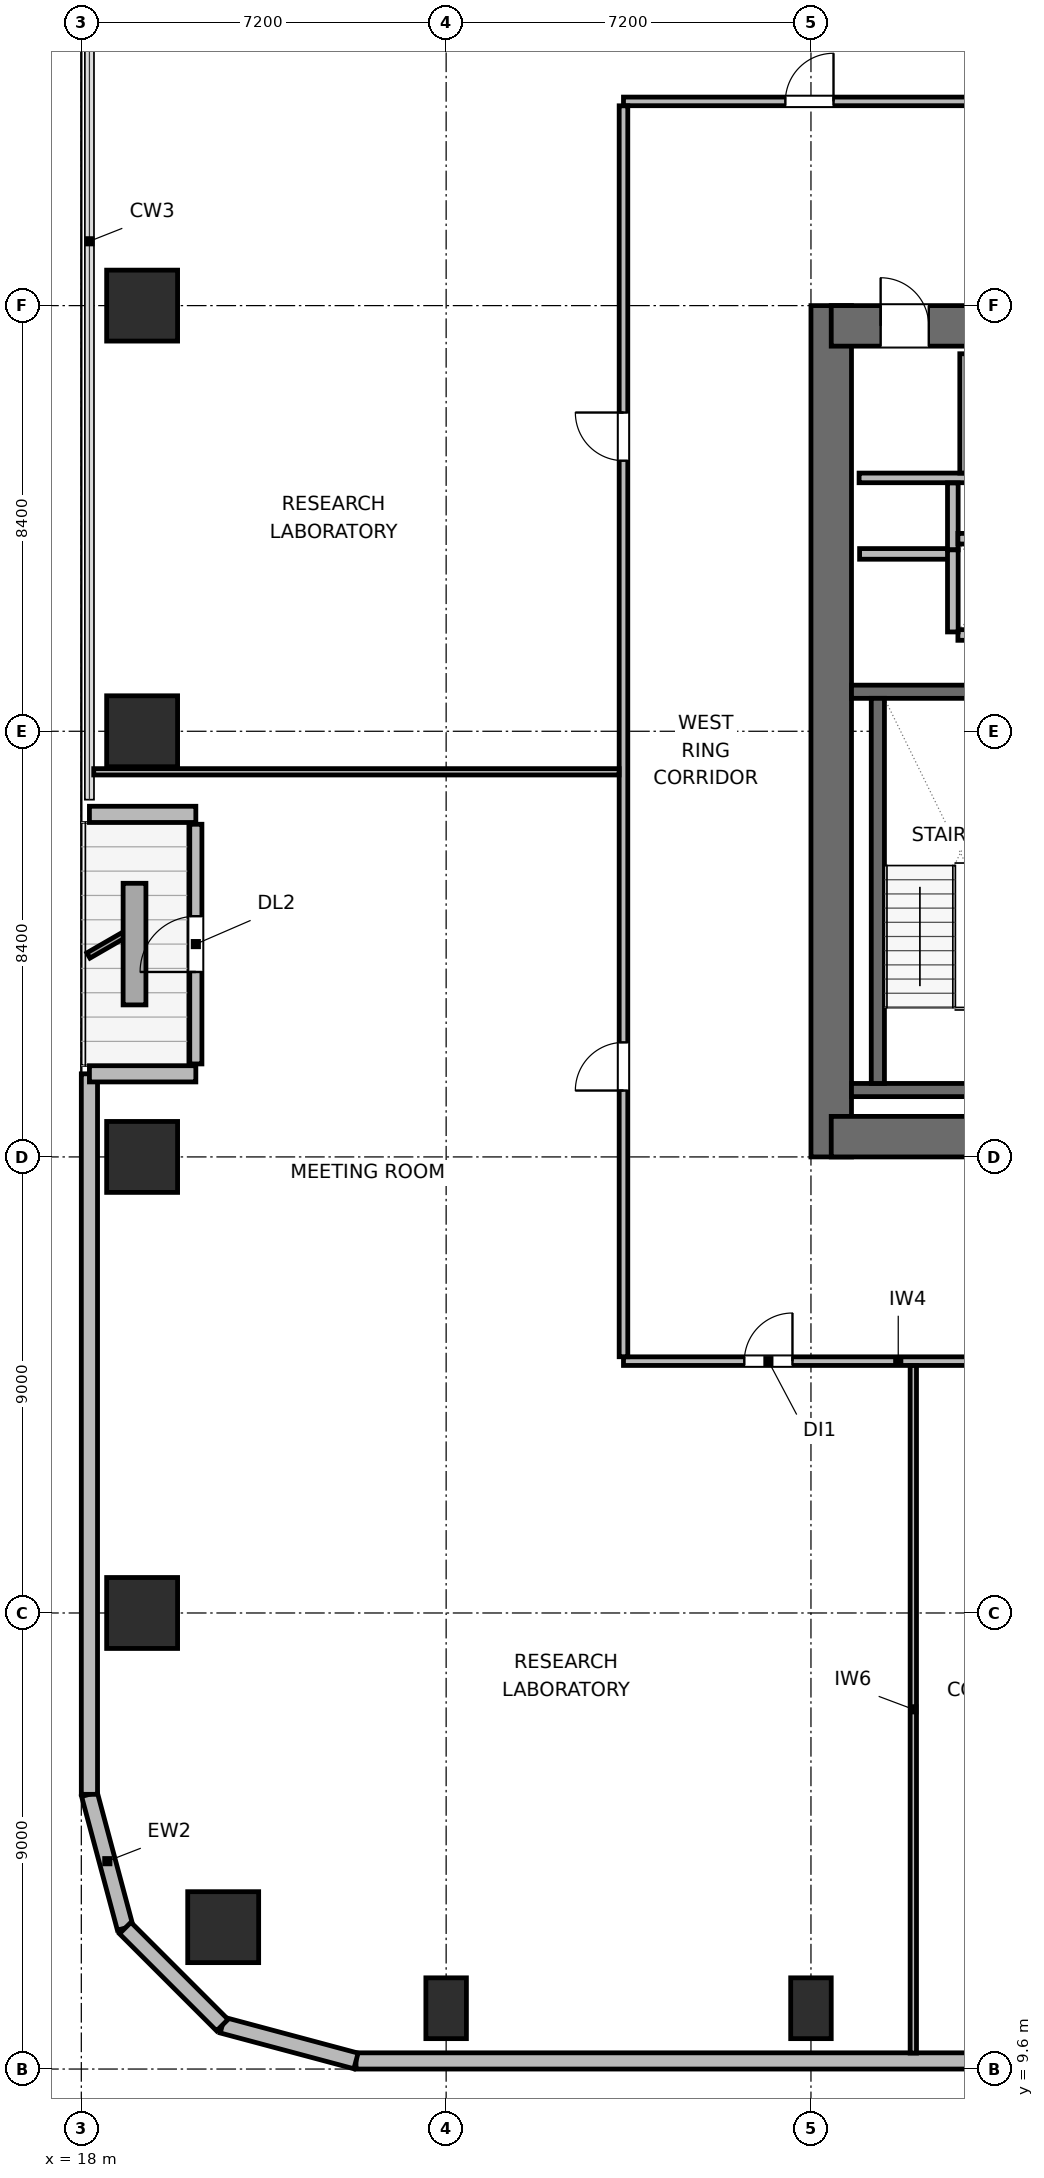
"""IFC4 building model, lengths in metres.
Left out: names, types, materials, properties, quantities, classifications, styles, units other than length and angle.
Written with IfcOpenShell. Run it as: python <this file> out.ifc"""

import sys

from ifc_helpers import new_model, si_unit, direction, frame, frame_2d, origin, origin_2d, place, context, subcontext, project, spatial, rectangle, circle, extrude, element, fill, save


model = new_model("IFC4")
c1 = context("Model", 3, precision=1e-05, world=origin(), true_north=direction((0.0, 1.0)))
c2 = subcontext(c1, "Body", "Model", "MODEL_VIEW")
j1 = project(units=[si_unit("LENGTHUNIT", "METRE"), si_unit("PLANEANGLEUNIT", "RADIAN")], contexts=[c1])
p1 = place(None, origin())
s1 = spatial("IfcSite", under=j1, at=p1, CompositionType="ELEMENT")
p2 = place(p1, origin())
s2 = spatial("IfcBuilding", under=s1, at=p2, CompositionType="ELEMENT")
p3 = place(p2, frame((0.0, 0.0, 109.2)))
s3 = spatial("IfcBuildingStorey", under=s2, at=p3, CompositionType="ELEMENT", Elevation=109.2)
p4 = place(p3, frame((32.8, 27.6, 0.0), z_axis=(0.0, 0.0, 1.0), x_axis=(0.0, 1.0, 0.0)))
e1 = element("IfcWall", 1, at=p4, inside=s3, PredefinedType="SHEAR", context=c2, shape_type="SweptSolid", body=[
    extrude(rectangle(XDim=16.8, YDim=0.8, at=frame_2d((8.4, 0.0))), origin(), (0.0, 0.0, 1.0), 3.9),
])
p5 = place(p3, frame((32.8, 28.0, 0.0), z_axis=(0.0, 0.0, 1.0), x_axis=(1.0, 0.0, 0.0)))
e2 = element("IfcWall", 2, at=p5, inside=s3, PredefinedType="SHEAR", context=c2, shape_type="SweptSolid", body=[
    extrude(rectangle(XDim=9.2, YDim=0.8, at=frame_2d((4.6, 0.0))), origin(), (0.0, 0.0, 1.0), 3.9),
])
p6 = place(p5, frame((4.975, 0.0, 0.0)))
e3 = element("IfcOpeningElement", 3, at=p6, cuts=e2, PredefinedType="OPENING", context=c2, shape_type="SweptSolid", body=[
    extrude(rectangle(XDim=1.05, YDim=2.04, at=frame_2d((0.525, 1.02))), frame((0.0, 0.41, 0.0), z_axis=(0.0, -1.0, 0.0), x_axis=(1.0, 0.0, 0.0)), (0.0, 0.0, 1.0), 0.82),
])
p7 = place(p3, frame((32.8, 44.0, 0.0), z_axis=(0.0, 0.0, 1.0), x_axis=(1.0, 0.0, 0.0)))
e4 = element("IfcWall", 4, at=p7, inside=s3, PredefinedType="SHEAR", context=c2, shape_type="SweptSolid", body=[
    extrude(rectangle(XDim=9.2, YDim=0.8, at=frame_2d((4.6, 0.0))), origin(), (0.0, 0.0, 1.0), 3.9),
])
p8 = place(p7, frame((0.975, 0.0, 0.0)))
e5 = element("IfcOpeningElement", 5, at=p8, cuts=e4, PredefinedType="OPENING", context=c2, shape_type="SweptSolid", body=[
    extrude(rectangle(XDim=0.95, YDim=2.04, at=frame_2d((0.475, 1.02))), frame((0.0, 0.41, 0.0), z_axis=(0.0, -1.0, 0.0), x_axis=(1.0, 0.0, 0.0)), (0.0, 0.0, 1.0), 0.82),
])
p9 = place(p7, frame((4.225, 0.0, 0.0)))
e6 = element("IfcOpeningElement", 6, at=p9, cuts=e4, PredefinedType="OPENING", context=c2, shape_type="SweptSolid", body=[
    extrude(rectangle(XDim=0.9, YDim=2.02, at=frame_2d((0.45, 1.01))), frame((0.0, 0.41, 0.0), z_axis=(0.0, -1.0, 0.0), x_axis=(1.0, 0.0, 0.0)), (0.0, 0.0, 1.0), 0.82),
])
p10 = place(p7, frame((7.125, 0.0, 0.0)))
e7 = element("IfcOpeningElement", 7, at=p10, cuts=e4, PredefinedType="OPENING", context=c2, shape_type="SweptSolid", body=[
    extrude(rectangle(XDim=0.9, YDim=2.02, at=frame_2d((0.45, 1.01))), frame((0.0, 0.41, 0.0), z_axis=(0.0, -1.0, 0.0), x_axis=(1.0, 0.0, 0.0)), (0.0, 0.0, 1.0), 0.82),
])
for number, where, z_axis, x_axis in (
    (8, (33.2, 28.92, 0.0), (0.0, 0.0, 1.0), (1.0, 0.0, 0.0)),
    (9, (33.2, 36.78, 0.0), (0.0, 0.0, 1.0), (1.0, 0.0, 0.0)),
):
    element("IfcWall", number, at=place(p3, frame(where, z_axis=z_axis, x_axis=x_axis)), inside=s3, PredefinedType="SHEAR", context=c2, shape_type="SweptSolid", body=[
        extrude(rectangle(XDim=3.91, YDim=0.26, at=frame_2d((1.955, 0.0))), origin(), (0.0, 0.0, 1.0), 3.9),
    ])
p11 = place(p3, frame((33.72, 29.05, 0.0), z_axis=(0.0, 0.0, 1.0), x_axis=(0.0, 1.0, 0.0)))
e10 = element("IfcWall", 10, at=p11, inside=s3, PredefinedType="SHEAR", context=c2, shape_type="SweptSolid", body=[
    extrude(rectangle(XDim=7.6, YDim=0.26, at=frame_2d((3.8, 0.0))), origin(), (0.0, 0.0, 1.0), 3.9),
])
p12 = place(p3, frame((20.8, 12.4, 0.0), z_axis=(0.0, 0.0, 1.0), x_axis=(1.0, 0.0, 0.0)))
e11 = element("IfcColumn", 11, at=p12, inside=s3, PredefinedType="COLUMN", context=c2, shape_type="SweptSolid", body=[
    extrude(circle(Radius=0.7, at=origin_2d()), origin(), (0.0, 0.0, 1.0), 3.9),
])
for number, where, z_axis, x_axis in (
    (12, (25.2, 10.8, 0.0), (0.0, 0.0, 1.0), (1.0, 0.0, 0.0)),
    (13, (32.4, 10.8, 0.0), (0.0, 0.0, 1.0), (1.0, 0.0, 0.0)),
):
    element("IfcColumn", number, at=place(p3, frame(where, z_axis=z_axis, x_axis=x_axis)), inside=s3, PredefinedType="COLUMN", context=c2, shape_type="SweptSolid", body=[
        extrude(rectangle(XDim=0.8, YDim=1.2, at=origin_2d()), origin(), (0.0, 0.0, 1.0), 3.9),
    ])
for number, where, z_axis, x_axis in (
    (14, (19.2, 18.6, 0.0), (0.0, 0.0, 1.0), (1.0, 0.0, 0.0)),
    (15, (19.2, 27.6, 0.0), (0.0, 0.0, 1.0), (1.0, 0.0, 0.0)),
    (16, (19.2, 36.0, 0.0), (0.0, 0.0, 1.0), (1.0, 0.0, 0.0)),
    (17, (19.2, 44.4, 0.0), (0.0, 0.0, 1.0), (1.0, 0.0, 0.0)),
):
    element("IfcColumn", number, at=place(p3, frame(where, z_axis=z_axis, x_axis=x_axis)), inside=s3, PredefinedType="COLUMN", context=c2, shape_type="SweptSolid", body=[
        extrude(rectangle(XDim=1.4, YDim=1.4, at=origin_2d()), origin(), (0.0, 0.0, 1.0), 3.9),
    ])
p13 = place(p3, frame((18.866, 12.383, 0.0), z_axis=(0.0, 0.0, 1.0), x_axis=(-0.25869736047, 0.965958423373, 0.0)))
e18 = element("IfcWall", 18, at=p13, inside=s3, PredefinedType="SOLIDWALL", context=c2, shape_type="SweptSolid", body=[
    extrude(rectangle(XDim=2.731, YDim=0.32, at=frame_2d((1.366, 0.0))), origin(), (0.0, 0.0, 1.0), 3.64),
])
p14 = place(p3, frame((18.16, 15.021, 0.0), z_axis=(0.0, 0.0, 1.0), x_axis=(0.0, 1.0, 0.0)))
e19 = element("IfcWall", 19, at=p14, inside=s3, PredefinedType="SOLIDWALL", context=c2, shape_type="SweptSolid", body=[
    extrude(rectangle(XDim=14.219, YDim=0.32, at=frame_2d((7.109, 0.0))), origin(), (0.0, 0.0, 1.0), 3.64),
])
p15 = place(p3, frame((18.16, 29.24, 0.0), z_axis=(0.0, 0.0, 1.0), x_axis=(1.0, 0.0, 0.0)))
e20 = element("IfcWall", 20, at=p15, inside=s3, PredefinedType="SOLIDWALL", context=c2, shape_type="SweptSolid", body=[
    extrude(rectangle(XDim=2.1, YDim=0.32, at=frame_2d((1.05, 0.0))), origin(), (0.0, 0.0, 1.0), 2.875),
])
p16 = place(p3, frame((20.26, 29.435, 0.0), z_axis=(0.0, 0.0, 1.0), x_axis=(0.0, 1.0, 0.0)))
e21 = element("IfcWall", 21, at=p16, inside=s3, PredefinedType="SOLIDWALL", context=c2, shape_type="SweptSolid", body=[
    extrude(rectangle(XDim=4.73, YDim=0.24, at=frame_2d((2.365, 0.0))), origin(), (0.0, 0.0, 1.0), 3.162),
])
p17 = place(p16, frame((1.815, 0.0, 0.0)))
e22 = element("IfcOpeningElement", 22, at=p17, cuts=e21, PredefinedType="OPENING", context=c2, shape_type="SweptSolid", body=[
    extrude(rectangle(XDim=1.1, YDim=2.04, at=frame_2d((0.55, 1.02))), frame((0.0, 0.13, 0.0), z_axis=(0.0, -1.0, 0.0), x_axis=(1.0, 0.0, 0.0)), (0.0, 0.0, 1.0), 0.26),
])
p18 = place(p3, frame((20.26, 34.36, 0.0), z_axis=(0.0, 0.0, 1.0), x_axis=(-1.0, 0.0, 0.0)))
e23 = element("IfcWall", 23, at=p18, inside=s3, PredefinedType="SOLIDWALL", context=c2, shape_type="SweptSolid", body=[
    extrude(rectangle(XDim=2.1, YDim=0.32, at=frame_2d((1.05, 0.0))), origin(), (0.0, 0.0, 1.0), 2.875),
])
p19 = place(p3, frame((41.355, 9.76, 0.0), z_axis=(0.0, 0.0, 1.0), x_axis=(-1.0, 0.0, 0.0)))
e24 = element("IfcWall", 24, at=p19, inside=s3, PredefinedType="SOLIDWALL", context=c2, shape_type="SweptSolid", body=[
    extrude(rectangle(XDim=17.934, YDim=0.32, at=frame_2d((8.967, 0.0))), origin(), (0.0, 0.0, 1.0), 3.64),
])
p20 = place(p3, frame((23.421, 9.76, 0.0), z_axis=(0.0, 0.0, 1.0), x_axis=(-0.965964405026, 0.25867502435, 0.0)))
e25 = element("IfcWall", 25, at=p20, inside=s3, PredefinedType="SOLIDWALL", context=c2, shape_type="SweptSolid", body=[
    extrude(rectangle(XDim=2.731, YDim=0.32, at=frame_2d((1.366, 0.0))), origin(), (0.0, 0.0, 1.0), 3.64),
])
p21 = place(p3, frame((20.783, 10.467, 0.0), z_axis=(0.0, 0.0, 1.0), x_axis=(-0.707106781187, 0.707106781187, 0.0)))
e26 = element("IfcWall", 26, at=p21, inside=s3, PredefinedType="SOLIDWALL", context=c2, shape_type="SweptSolid", body=[
    extrude(rectangle(XDim=2.71, YDim=0.32, at=frame_2d((1.355, 0.0))), origin(), (0.0, 0.0, 1.0), 3.64),
])
p22 = place(p3, frame((33.35, 41.0, 0.0), z_axis=(0.0, 0.0, 1.0), x_axis=(1.0, 0.0, 0.0)))
e27 = element("IfcWall", 27, at=p22, inside=s3, PredefinedType="PLUMBINGWALL", context=c2, shape_type="SweptSolid", body=[
    extrude(rectangle(XDim=8.1, YDim=0.19, at=frame_2d((4.05, 0.0))), origin(), (0.0, 0.0, 1.0), 3.64),
])
p23 = place(p3, frame((35.4, 41.095, 0.0), z_axis=(0.0, 0.0, 1.0), x_axis=(0.0, 1.0, 0.0)))
e28 = element("IfcWall", 28, at=p23, inside=s3, PredefinedType="PARTITIONING", context=c2, shape_type="SweptSolid", body=[
    extrude(rectangle(XDim=2.355, YDim=0.125, at=frame_2d((1.177, 0.0))), origin(), (0.0, 0.0, 1.0), 3.64),
])
p24 = place(p3, frame((33.36, 39.5, 0.0), z_axis=(0.0, 0.0, 1.0), x_axis=(1.0, 0.0, 0.0)))
e29 = element("IfcWall", 29, at=p24, inside=s3, PredefinedType="PARTITIONING", context=c2, shape_type="SweptSolid", body=[
    extrude(rectangle(XDim=1.86, YDim=0.21, at=frame_2d((0.93, 0.0))), origin(), (0.0, 0.0, 1.0), 3.64),
])
p25 = place(p3, frame((35.2, 39.58, 0.0), z_axis=(0.0, 0.0, 1.0), x_axis=(0.0, 1.0, 0.0)))
e30 = element("IfcWall", 30, at=p25, inside=s3, PredefinedType="PARTITIONING", context=c2, shape_type="SweptSolid", body=[
    extrude(rectangle(XDim=1.32, YDim=0.21, at=frame_2d((0.66, 0.0))), origin(), (0.0, 0.0, 1.0), 3.64),
])
for number, where, z_axis, x_axis in (
    (31, (35.3, 37.9, 0.0), (0.0, 0.0, 1.0), (1.0, 0.0, 0.0)),
    (32, (35.3, 39.8, 0.0), (0.0, 0.0, 1.0), (1.0, 0.0, 0.0)),
):
    element("IfcWall", number, at=place(p3, frame(where, z_axis=z_axis, x_axis=x_axis)), inside=s3, PredefinedType="PARTITIONING", context=c2, shape_type="SweptSolid", body=[
        extrude(rectangle(XDim=1.9, YDim=0.21, at=frame_2d((0.95, 0.0))), origin(), (0.0, 0.0, 1.0), 3.64),
    ])
p26 = place(p3, frame((35.2, 37.96, 0.0), z_axis=(0.0, 0.0, 1.0), x_axis=(0.0, 1.0, 0.0)))
e33 = element("IfcWall", 33, at=p26, inside=s3, PredefinedType="PARTITIONING", context=c2, shape_type="SweptSolid", body=[
    extrude(rectangle(XDim=1.62, YDim=0.21, at=frame_2d((0.81, 0.0))), origin(), (0.0, 0.0, 1.0), 3.64),
])
p27 = place(p3, frame((28.7, 23.57, 0.0), z_axis=(0.0, 0.0, 1.0), x_axis=(1.0, 0.0, 0.0)))
e34 = element("IfcWall", 34, at=p27, inside=s3, PredefinedType="PARTITIONING", context=c2, shape_type="SweptSolid", body=[
    extrude(rectangle(XDim=38.6, YDim=0.17, at=frame_2d((19.3, 0.0))), origin(), (0.0, 0.0, 1.0), 3.64),
])
p28 = place(p27, frame((2.385, 0.0, 0.0)))
e35 = element("IfcOpeningElement", 35, at=p28, cuts=e34, PredefinedType="OPENING", context=c2, shape_type="SweptSolid", body=[
    extrude(rectangle(XDim=0.95, YDim=2.04, at=frame_2d((0.475, 1.02))), frame((0.0, 0.095, 0.0), z_axis=(0.0, -1.0, 0.0), x_axis=(1.0, 0.0, 0.0)), (0.0, 0.0, 1.0), 0.19),
])
p29 = place(p27, frame((7.51, 0.0, 0.0)))
e36 = element("IfcOpeningElement", 36, at=p29, cuts=e34, PredefinedType="OPENING", context=c2, shape_type="SweptSolid", body=[
    extrude(rectangle(XDim=0.95, YDim=2.04, at=frame_2d((0.475, 1.02))), frame((0.0, 0.095, 0.0), z_axis=(0.0, -1.0, 0.0), x_axis=(1.0, 0.0, 0.0)), (0.0, 0.0, 1.0), 0.19),
])
p30 = place(p27, frame((12.035, 0.0, 0.0)))
e37 = element("IfcOpeningElement", 37, at=p30, cuts=e34, PredefinedType="OPENING", context=c2, shape_type="SweptSolid", body=[
    extrude(rectangle(XDim=0.95, YDim=2.04, at=frame_2d((0.475, 1.02))), frame((0.0, 0.095, 0.0), z_axis=(0.0, -1.0, 0.0), x_axis=(1.0, 0.0, 0.0)), (0.0, 0.0, 1.0), 0.19),
])
p31 = place(p27, frame((16.56, 0.0, 0.0)))
e38 = element("IfcOpeningElement", 38, at=p31, cuts=e34, PredefinedType="OPENING", context=c2, shape_type="SweptSolid", body=[
    extrude(rectangle(XDim=0.95, YDim=2.04, at=frame_2d((0.475, 1.02))), frame((0.0, 0.095, 0.0), z_axis=(0.0, -1.0, 0.0), x_axis=(1.0, 0.0, 0.0)), (0.0, 0.0, 1.0), 0.19),
])
p32 = place(p27, frame((21.085, 0.0, 0.0)))
e39 = element("IfcOpeningElement", 39, at=p32, cuts=e34, PredefinedType="OPENING", context=c2, shape_type="SweptSolid", body=[
    extrude(rectangle(XDim=0.95, YDim=2.04, at=frame_2d((0.475, 1.02))), frame((0.0, 0.095, 0.0), z_axis=(0.0, -1.0, 0.0), x_axis=(1.0, 0.0, 0.0)), (0.0, 0.0, 1.0), 0.19),
])
p33 = place(p27, frame((25.61, 0.0, 0.0)))
e40 = element("IfcOpeningElement", 40, at=p33, cuts=e34, PredefinedType="OPENING", context=c2, shape_type="SweptSolid", body=[
    extrude(rectangle(XDim=0.95, YDim=2.04, at=frame_2d((0.475, 1.02))), frame((0.0, 0.095, 0.0), z_axis=(0.0, -1.0, 0.0), x_axis=(1.0, 0.0, 0.0)), (0.0, 0.0, 1.0), 0.19),
])
p34 = place(p27, frame((30.135, 0.0, 0.0)))
e41 = element("IfcOpeningElement", 41, at=p34, cuts=e34, PredefinedType="OPENING", context=c2, shape_type="SweptSolid", body=[
    extrude(rectangle(XDim=0.95, YDim=2.04, at=frame_2d((0.475, 1.02))), frame((0.0, 0.095, 0.0), z_axis=(0.0, -1.0, 0.0), x_axis=(1.0, 0.0, 0.0)), (0.0, 0.0, 1.0), 0.19),
])
p35 = place(p27, frame((35.26, 0.0, 0.0)))
e42 = element("IfcOpeningElement", 42, at=p35, cuts=e34, PredefinedType="OPENING", context=c2, shape_type="SweptSolid", body=[
    extrude(rectangle(XDim=0.95, YDim=2.04, at=frame_2d((0.475, 1.02))), frame((0.0, 0.095, 0.0), z_axis=(0.0, -1.0, 0.0), x_axis=(1.0, 0.0, 0.0)), (0.0, 0.0, 1.0), 0.19),
])
p36 = place(p3, frame((28.7, 48.43, 0.0), z_axis=(0.0, 0.0, 1.0), x_axis=(1.0, 0.0, 0.0)))
e43 = element("IfcWall", 43, at=p36, inside=s3, PredefinedType="PARTITIONING", context=c2, shape_type="SweptSolid", body=[
    extrude(rectangle(XDim=38.6, YDim=0.17, at=frame_2d((19.3, 0.0))), origin(), (0.0, 0.0, 1.0), 3.64),
])
p37 = place(p36, frame((3.195, 0.0, 0.0)))
e44 = element("IfcOpeningElement", 44, at=p37, cuts=e43, PredefinedType="OPENING", context=c2, shape_type="SweptSolid", body=[
    extrude(rectangle(XDim=0.95, YDim=2.04, at=frame_2d((0.475, 1.02))), frame((0.0, 0.095, 0.0), z_axis=(0.0, -1.0, 0.0), x_axis=(1.0, 0.0, 0.0)), (0.0, 0.0, 1.0), 0.19),
])
p38 = place(p36, frame((16.605, 0.0, 0.0)))
e45 = element("IfcOpeningElement", 45, at=p38, cuts=e43, PredefinedType="OPENING", context=c2, shape_type="SweptSolid", body=[
    extrude(rectangle(XDim=0.95, YDim=2.04, at=frame_2d((0.475, 1.02))), frame((0.0, 0.095, 0.0), z_axis=(0.0, -1.0, 0.0), x_axis=(1.0, 0.0, 0.0)), (0.0, 0.0, 1.0), 0.19),
])
p39 = place(p36, frame((32.235, 0.0, 0.0)))
e46 = element("IfcOpeningElement", 46, at=p39, cuts=e43, PredefinedType="OPENING", context=c2, shape_type="SweptSolid", body=[
    extrude(rectangle(XDim=0.95, YDim=2.04, at=frame_2d((0.475, 1.02))), frame((0.0, 0.095, 0.0), z_axis=(0.0, -1.0, 0.0), x_axis=(1.0, 0.0, 0.0)), (0.0, 0.0, 1.0), 0.19),
])
p40 = place(p3, frame((28.7, 23.657, 0.0), z_axis=(0.0, 0.0, 1.0), x_axis=(0.0, 1.0, 0.0)))
e47 = element("IfcWall", 47, at=p40, inside=s3, PredefinedType="PARTITIONING", context=c2, shape_type="SweptSolid", body=[
    extrude(rectangle(XDim=24.686, YDim=0.17, at=frame_2d((12.343, 0.0))), origin(), (0.0, 0.0, 1.0), 3.64),
])
p41 = place(p40, frame((5.253, 0.0, 0.0)))
e48 = element("IfcOpeningElement", 48, at=p41, cuts=e47, PredefinedType="OPENING", context=c2, shape_type="SweptSolid", body=[
    extrude(rectangle(XDim=0.95, YDim=2.04, at=frame_2d((0.475, 1.02))), frame((0.0, 0.095, 0.0), z_axis=(0.0, -1.0, 0.0), x_axis=(1.0, 0.0, 0.0)), (0.0, 0.0, 1.0), 0.19),
])
p42 = place(p40, frame((17.683, 0.0, 0.0)))
e49 = element("IfcOpeningElement", 49, at=p42, cuts=e47, PredefinedType="OPENING", context=c2, shape_type="SweptSolid", body=[
    extrude(rectangle(XDim=0.95, YDim=2.04, at=frame_2d((0.475, 1.02))), frame((0.0, 0.095, 0.0), z_axis=(0.0, -1.0, 0.0), x_axis=(1.0, 0.0, 0.0)), (0.0, 0.0, 1.0), 0.19),
])
p43 = place(p3, frame((34.42, 9.915, 0.0), z_axis=(0.0, 0.0, 1.0), x_axis=(0.0, 1.0, 0.0)))
e50 = element("IfcWall", 50, at=p43, inside=s3, PredefinedType="PARTITIONING", context=c2, shape_type="SweptSolid", body=[
    extrude(rectangle(XDim=13.568, YDim=0.125, at=frame_2d((6.784, 0.0))), origin(), (0.0, 0.0, 1.0), 3.64),
])
p44 = place(p3, frame((18.245, 35.2, 0.0), z_axis=(0.0, 0.0, 1.0), x_axis=(1.0, 0.0, 0.0)))
e51 = element("IfcWall", 51, at=p44, inside=s3, PredefinedType="PARTITIONING", context=c2, shape_type="SweptSolid", body=[
    extrude(rectangle(XDim=10.368, YDim=0.125, at=frame_2d((5.184, 0.0))), origin(), (0.0, 0.0, 1.0), 3.64),
])
p45 = place(p17, origin())
e52 = element("IfcDoor", 52, at=p45, inside=s3, OperationType="SINGLE_SWING_LEFT", PredefinedType="DOOR", context=c2, shape_type="SweptSolid", body=[
    extrude(rectangle(XDim=1.1, YDim=2.04, at=frame_2d((0.55, 1.02))), frame((0.0, 0.025, 0.0), z_axis=(0.0, -1.0, 0.0), x_axis=(1.0, 0.0, 0.0)), (0.0, 0.0, 1.0), 0.05),
])
fill(e22, e52)
p46 = place(p8, origin())
e53 = element("IfcDoor", 53, at=p46, inside=s3, OperationType="SINGLE_SWING_LEFT", PredefinedType="DOOR", context=c2, shape_type="SweptSolid", body=[
    extrude(rectangle(XDim=0.95, YDim=2.04, at=frame_2d((0.475, 1.02))), frame((0.0, 0.025, 0.0), z_axis=(0.0, -1.0, 0.0), x_axis=(1.0, 0.0, 0.0)), (0.0, 0.0, 1.0), 0.05),
])
fill(e5, e53)
p47 = place(p28, origin())
e54 = element("IfcDoor", 54, at=p47, inside=s3, OperationType="SINGLE_SWING_RIGHT", PredefinedType="DOOR", context=c2, shape_type="SweptSolid", body=[
    extrude(rectangle(XDim=0.95, YDim=2.04, at=frame_2d((0.475, 1.02))), frame((0.0, 0.025, 0.0), z_axis=(0.0, -1.0, 0.0), x_axis=(1.0, 0.0, 0.0)), (0.0, 0.0, 1.0), 0.05),
])
fill(e35, e54)
p48 = place(p37, origin())
e55 = element("IfcDoor", 55, at=p48, inside=s3, OperationType="SINGLE_SWING_RIGHT", PredefinedType="DOOR", context=c2, shape_type="SweptSolid", body=[
    extrude(rectangle(XDim=0.95, YDim=2.04, at=frame_2d((0.475, 1.02))), frame((0.0, 0.025, 0.0), z_axis=(0.0, -1.0, 0.0), x_axis=(1.0, 0.0, 0.0)), (0.0, 0.0, 1.0), 0.05),
])
fill(e44, e55)
p49 = place(p41, origin())
e56 = element("IfcDoor", 56, at=p49, inside=s3, OperationType="SINGLE_SWING_LEFT", PredefinedType="DOOR", context=c2, shape_type="SweptSolid", body=[
    extrude(rectangle(XDim=0.95, YDim=2.04, at=frame_2d((0.475, 1.02))), frame((0.0, 0.025, 0.0), z_axis=(0.0, -1.0, 0.0), x_axis=(1.0, 0.0, 0.0)), (0.0, 0.0, 1.0), 0.05),
])
fill(e48, e56)
p50 = place(p42, origin())
e57 = element("IfcDoor", 57, at=p50, inside=s3, OperationType="SINGLE_SWING_RIGHT", PredefinedType="DOOR", context=c2, shape_type="SweptSolid", body=[
    extrude(rectangle(XDim=0.95, YDim=2.04, at=frame_2d((0.475, 1.02))), frame((0.0, 0.025, 0.0), z_axis=(0.0, -1.0, 0.0), x_axis=(1.0, 0.0, 0.0)), (0.0, 0.0, 1.0), 0.05),
])
fill(e49, e57)
save(model, sys.argv[1])
